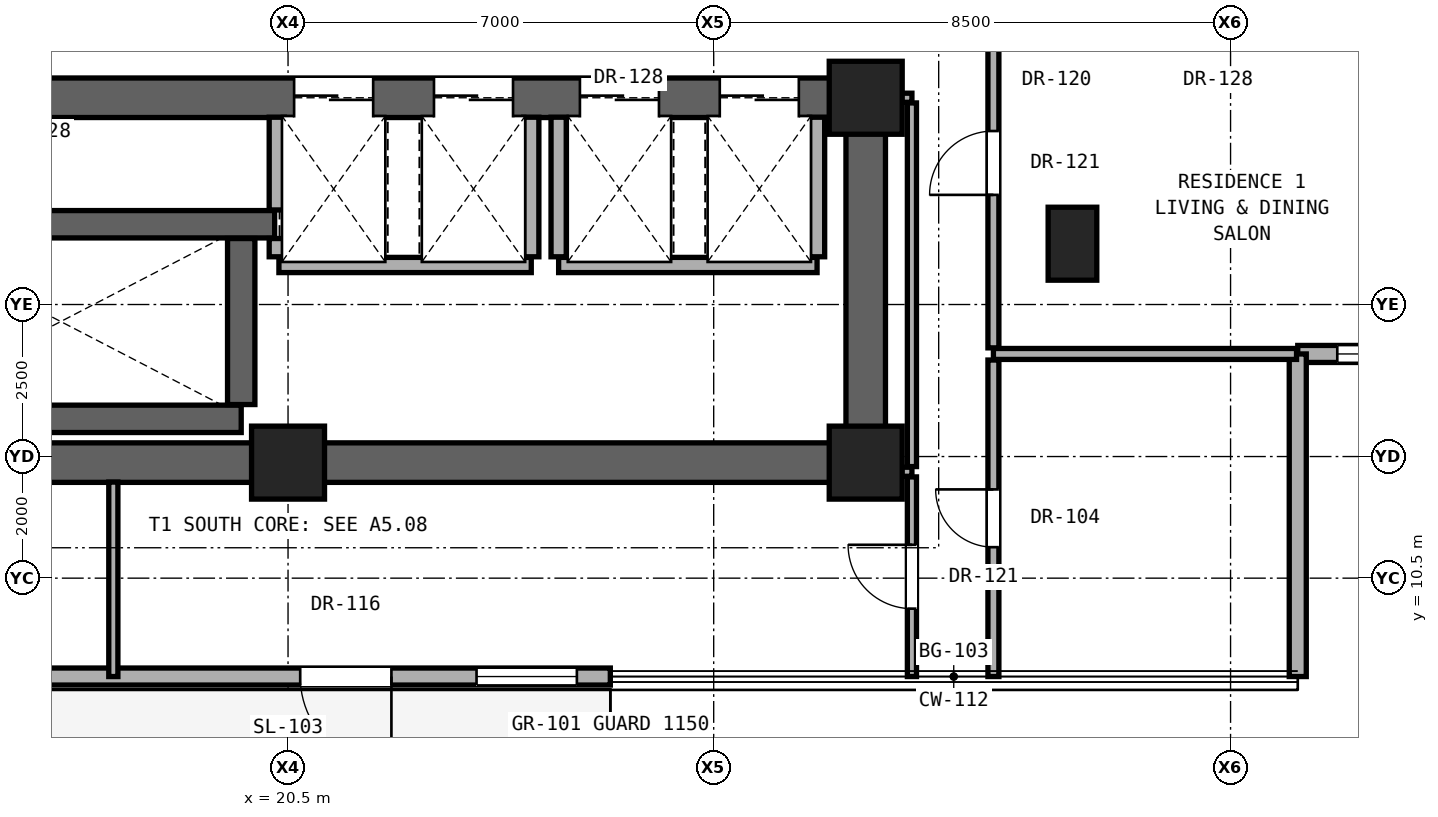
"""IFC4 building model, lengths in metres.
Left out: names, types, materials, properties, quantities, classifications, styles, units other than length and angle.
Written with IfcOpenShell. Run it as: python <this file> out.ifc"""

import sys

from ifc_helpers import new_model, si_unit, direction, frame, frame_2d, origin, origin_2d, place, context, subcontext, project, spatial, rectangle, extrude, element, fill, save


model = new_model("IFC4")
c1 = context("Model", 3, precision=1e-05, world=origin(), true_north=direction((0.0, 1.0)))
c2 = subcontext(c1, "Body", "Model", "MODEL_VIEW")
j1 = project(units=[si_unit("LENGTHUNIT", "METRE"), si_unit("PLANEANGLEUNIT", "RADIAN")], contexts=[c1])
p1 = place(None, origin())
s1 = spatial("IfcSite", under=j1, at=p1, CompositionType="ELEMENT")
p2 = place(p1, origin())
s2 = spatial("IfcBuilding", under=s1, at=p2, CompositionType="ELEMENT")
p3 = place(p2, frame((0.0, 0.0, 108.2)))
s3 = spatial("IfcBuildingStorey", under=s2, at=p3, CompositionType="ELEMENT", Elevation=108.2)
for number, where, z_axis, x_axis in (
    (1, (20.5, 12.4, 0.0), (0.0, 0.0, 1.0), (1.0, 0.0, 0.0)),
    (2, (30.0, 12.4, 0.0), (0.0, 0.0, 1.0), (1.0, 0.0, 0.0)),
    (3, (30.0, 18.4, 0.0), (0.0, 0.0, 1.0), (1.0, 0.0, 0.0)),
):
    element("IfcColumn", number, at=place(p3, frame(where, z_axis=z_axis, x_axis=x_axis)), inside=s3, PredefinedType="COLUMN", context=c2, shape_type="SweptSolid", body=[
        extrude(rectangle(XDim=1.2, YDim=1.2, at=origin_2d()), origin(), (0.0, 0.0, 1.0), 3.3),
    ])
p4 = place(p3, frame((33.4, 16.0, 0.0), z_axis=(0.0, 0.0, 1.0), x_axis=(1.0, 0.0, 0.0)))
e4 = element("IfcColumn", 4, at=p4, inside=s3, PredefinedType="PILASTER", context=c2, shape_type="SweptSolid", body=[
    extrude(rectangle(XDim=0.8, YDim=1.2, at=origin_2d()), origin(), (0.0, 0.0, 1.0), 3.3),
])
p5 = place(p3, frame((11.0, 12.4, 0.0), z_axis=(0.0, 0.0, 1.0), x_axis=(1.0, 0.0, 0.0)))
e5 = element("IfcWall", 5, at=p5, inside=s3, PredefinedType="SHEAR", context=c2, shape_type="SweptSolid", body=[
    extrude(rectangle(XDim=19.0, YDim=0.65, at=frame_2d((9.5, 0.0))), origin(), (0.0, 0.0, 1.0), 3.08),
])
p6 = place(p3, frame((30.0, 12.4, 0.0), z_axis=(0.0, 0.0, 1.0), x_axis=(0.0, 1.0, 0.0)))
e6 = element("IfcWall", 6, at=p6, inside=s3, PredefinedType="SHEAR", context=c2, shape_type="SweptSolid", body=[
    extrude(rectangle(XDim=6.0, YDim=0.65, at=frame_2d((3.0, 0.0))), origin(), (0.0, 0.0, 1.0), 3.08),
])
p7 = place(p3, frame((11.0, 18.4, 0.0), z_axis=(0.0, 0.0, 1.0), x_axis=(1.0, 0.0, 0.0)))
e7 = element("IfcWall", 7, at=p7, inside=s3, PredefinedType="SHEAR", context=c2, shape_type="SweptSolid", body=[
    extrude(rectangle(XDim=19.0, YDim=0.65, at=frame_2d((9.5, 0.0))), origin(), (0.0, 0.0, 1.0), 3.08),
])
p8 = place(p7, frame((4.175, 0.0, 0.0)))
e8 = element("IfcOpeningElement", 8, at=p8, cuts=e7, PredefinedType="OPENING", context=c2, shape_type="SweptSolid", body=[
    extrude(rectangle(XDim=1.2, YDim=2.25, at=frame_2d((0.6, 1.125))), frame((0.0, 0.335, 0.0), z_axis=(0.0, -1.0, 0.0), x_axis=(1.0, 0.0, 0.0)), (0.0, 0.0, 1.0), 0.67),
])
p9 = place(p7, frame((9.6, 0.0, 0.0)))
e9 = element("IfcOpeningElement", 9, at=p9, cuts=e7, PredefinedType="OPENING", context=c2, shape_type="SweptSolid", body=[
    extrude(rectangle(XDim=1.3, YDim=2.3, at=frame_2d((0.65, 1.15))), frame((0.0, 0.335, 0.0), z_axis=(0.0, -1.0, 0.0), x_axis=(1.0, 0.0, 0.0)), (0.0, 0.0, 1.0), 0.67),
])
p10 = place(p7, frame((11.9, 0.0, 0.0)))
e10 = element("IfcOpeningElement", 10, at=p10, cuts=e7, PredefinedType="OPENING", context=c2, shape_type="SweptSolid", body=[
    extrude(rectangle(XDim=1.3, YDim=2.3, at=frame_2d((0.65, 1.15))), frame((0.0, 0.335, 0.0), z_axis=(0.0, -1.0, 0.0), x_axis=(1.0, 0.0, 0.0)), (0.0, 0.0, 1.0), 0.67),
])
p11 = place(p7, frame((14.3, 0.0, 0.0)))
e11 = element("IfcOpeningElement", 11, at=p11, cuts=e7, PredefinedType="OPENING", context=c2, shape_type="SweptSolid", body=[
    extrude(rectangle(XDim=1.3, YDim=2.3, at=frame_2d((0.65, 1.15))), frame((0.0, 0.335, 0.0), z_axis=(0.0, -1.0, 0.0), x_axis=(1.0, 0.0, 0.0)), (0.0, 0.0, 1.0), 0.67),
])
p12 = place(p7, frame((16.6, 0.0, 0.0)))
e12 = element("IfcOpeningElement", 12, at=p12, cuts=e7, PredefinedType="OPENING", context=c2, shape_type="SweptSolid", body=[
    extrude(rectangle(XDim=1.3, YDim=2.3, at=frame_2d((0.65, 1.15))), frame((0.0, 0.335, 0.0), z_axis=(0.0, -1.0, 0.0), x_axis=(1.0, 0.0, 0.0)), (0.0, 0.0, 1.0), 0.67),
])
p13 = place(p3, frame((25.8, 8.882, 0.0), z_axis=(0.0, 0.0, 1.0), x_axis=(-1.0, 0.0, 0.0)))
e13 = element("IfcWall", 13, at=p13, inside=s3, PredefinedType="SOLIDWALL", context=c2, shape_type="SweptSolid", body=[
    extrude(rectangle(XDim=10.6, YDim=0.28, at=frame_2d((5.3, 0.0))), origin(), (0.0, 0.0, 1.0), 3.04),
])
p14 = place(p13, frame((0.55, 0.0, 0.69)))
e14 = element("IfcOpeningElement", 14, at=p14, cuts=e13, PredefinedType="OPENING", context=c2, shape_type="SweptSolid", body=[
    extrude(rectangle(XDim=1.65, YDim=2.2, at=frame_2d((0.825, 1.1))), frame((0.0, 0.15, 0.0), z_axis=(0.0, -1.0, 0.0), x_axis=(1.0, 0.0, 0.0)), (0.0, 0.0, 1.0), 0.3),
])
p15 = place(p13, frame((3.6, 0.0, 0.0)))
e15 = element("IfcOpeningElement", 15, at=p15, cuts=e13, PredefinedType="OPENING", context=c2, shape_type="SweptSolid", body=[
    extrude(rectangle(XDim=1.5, YDim=2.3, at=frame_2d((0.75, 1.15))), frame((0.0, 0.15, 0.0), z_axis=(0.0, -1.0, 0.0), x_axis=(1.0, 0.0, 0.0)), (0.0, 0.0, 1.0), 0.3),
])
p16 = place(p3, frame((37.105, 14.187, 0.0), z_axis=(0.0, 0.0, 1.0), x_axis=(1.0, 0.0, 0.0)))
e16 = element("IfcWall", 16, at=p16, inside=s3, PredefinedType="SOLIDWALL", context=c2, shape_type="SweptSolid", body=[
    extrude(rectangle(XDim=5.305, YDim=0.28, at=frame_2d((2.652, 0.0))), origin(), (0.0, 0.0, 1.0), 3.06),
])
p17 = place(p16, frame((0.65, 0.0, 0.85)))
e17 = element("IfcOpeningElement", 17, at=p17, cuts=e16, PredefinedType="OPENING", context=c2, shape_type="SweptSolid", body=[
    extrude(rectangle(XDim=1.1, YDim=2.0, at=frame_2d((0.55, 1.0))), frame((0.0, 0.15, 0.0), z_axis=(0.0, -1.0, 0.0), x_axis=(1.0, 0.0, 0.0)), (0.0, 0.0, 1.0), 0.3),
])
p18 = place(p3, frame((37.105, 8.882, 0.0), z_axis=(0.0, 0.0, 1.0), x_axis=(0.0, 1.0, 0.0)))
e18 = element("IfcWall", 18, at=p18, inside=s3, PredefinedType="SOLIDWALL", context=c2, shape_type="SweptSolid", body=[
    extrude(rectangle(XDim=5.305, YDim=0.28, at=frame_2d((2.652, 0.0))), origin(), (0.0, 0.0, 1.0), 3.06),
])
p19 = place(p3, frame((30.32, 12.25, 0.0), z_axis=(0.0, 0.0, 1.0), x_axis=(1.0, 0.0, 0.0)))
e19 = element("IfcWall", 19, at=p19, inside=s3, PredefinedType="PARTITIONING", context=c2, shape_type="SweptSolid", body=[
    extrude(rectangle(XDim=0.44, YDim=0.15, at=frame_2d((0.22, 0.0))), origin(), (0.0, 0.0, 1.0), 3.08),
])
p20 = place(p3, frame((11.32, 13.12, 0.0), z_axis=(0.0, 0.0, 1.0), x_axis=(1.0, 0.0, 0.0)))
e20 = element("IfcWall", 20, at=p20, inside=s3, PredefinedType="SHEAR", context=c2, shape_type="SweptSolid", body=[
    extrude(rectangle(XDim=8.41, YDim=0.45, at=frame_2d((4.205, 0.0))), origin(), (0.0, 0.0, 1.0), 3.08),
])
p21 = place(p3, frame((32.1, 14.187, 0.0), z_axis=(0.0, 0.0, 1.0), x_axis=(1.0, 0.0, 0.0)))
e21 = element("IfcWall", 21, at=p21, inside=s3, PredefinedType="PARTITIONING", context=c2, shape_type="SweptSolid", body=[
    extrude(rectangle(XDim=4.985, YDim=0.18, at=frame_2d((2.492, 0.0))), origin(), (0.0, 0.0, 1.0), 3.08),
])
p22 = place(p3, frame((20.35, 15.65, 0.0), z_axis=(0.0, 0.0, 1.0), x_axis=(1.0, 0.0, 0.0)))
e22 = element("IfcWall", 22, at=p22, inside=s3, PredefinedType="SOLIDWALL", context=c2, shape_type="SweptSolid", body=[
    extrude(rectangle(XDim=4.15, YDim=0.25, at=frame_2d((2.075, 0.0))), origin(), (0.0, 0.0, 1.0), 3.08),
])
p23 = place(p3, frame((24.95, 15.65, 0.0), z_axis=(0.0, 0.0, 1.0), x_axis=(1.0, 0.0, 0.0)))
e23 = element("IfcWall", 23, at=p23, inside=s3, PredefinedType="SOLIDWALL", context=c2, shape_type="SweptSolid", body=[
    extrude(rectangle(XDim=4.25, YDim=0.25, at=frame_2d((2.125, 0.0))), origin(), (0.0, 0.0, 1.0), 3.08),
])
p24 = place(p3, frame((11.32, 16.32, 0.0), z_axis=(0.0, 0.0, 1.0), x_axis=(1.0, 0.0, 0.0)))
e24 = element("IfcWall", 24, at=p24, inside=s3, PredefinedType="SHEAR", context=c2, shape_type="SweptSolid", body=[
    extrude(rectangle(XDim=8.96, YDim=0.45, at=frame_2d((4.48, 0.0))), origin(), (0.0, 0.0, 1.0), 3.08),
])
p25 = place(p24, frame((0.495, 0.0, 0.0)))
e25 = element("IfcOpeningElement", 25, at=p25, cuts=e24, PredefinedType="OPENING", context=c2, shape_type="SweptSolid", body=[
    extrude(rectangle(XDim=1.15, YDim=2.2, at=frame_2d((0.575, 1.1))), frame((0.0, 0.235, 0.0), z_axis=(0.0, -1.0, 0.0), x_axis=(1.0, 0.0, 0.0)), (0.0, 0.0, 1.0), 0.47),
])
p26 = place(p3, frame((30.32, 18.4, 0.0), z_axis=(0.0, 0.0, 1.0), x_axis=(1.0, 0.0, 0.0)))
e26 = element("IfcWall", 26, at=p26, inside=s3, PredefinedType="PARTITIONING", context=c2, shape_type="SweptSolid", body=[
    extrude(rectangle(XDim=0.44, YDim=0.15, at=frame_2d((0.22, 0.0))), origin(), (0.0, 0.0, 1.0), 2.456),
])
p27 = place(p3, frame((17.627, 8.882, 0.0), z_axis=(0.0, 0.0, 1.0), x_axis=(0.0, 1.0, 0.0)))
e27 = element("IfcWall", 27, at=p27, inside=s3, PredefinedType="PARTITIONING", context=c2, shape_type="SweptSolid", body=[
    extrude(rectangle(XDim=3.198, YDim=0.15, at=frame_2d((1.599, 0.0))), origin(), (0.0, 0.0, 1.0), 3.08),
])
p28 = place(p3, frame((19.73, 13.355, 0.0), z_axis=(0.0, 0.0, 1.0), x_axis=(0.0, 1.0, 0.0)))
e28 = element("IfcWall", 28, at=p28, inside=s3, PredefinedType="SHEAR", context=c2, shape_type="SweptSolid", body=[
    extrude(rectangle(XDim=2.73, YDim=0.45, at=frame_2d((1.365, 0.0))), origin(), (0.0, 0.0, 1.0), 3.08),
])
p29 = place(p3, frame((20.315, 15.785, 0.0), z_axis=(0.0, 0.0, 1.0), x_axis=(0.0, 1.0, 0.0)))
e29 = element("IfcWall", 29, at=p29, inside=s3, PredefinedType="SOLIDWALL", context=c2, shape_type="SweptSolid", body=[
    extrude(rectangle(XDim=0.3, YDim=0.25, at=frame_2d((0.15, 0.0))), origin(), (0.0, 0.0, 1.0), 3.08),
])
p30 = place(p3, frame((20.315, 16.555, 0.0), z_axis=(0.0, 0.0, 1.0), x_axis=(0.0, 1.0, 0.0)))
e30 = element("IfcWall", 30, at=p30, inside=s3, PredefinedType="SOLIDWALL", context=c2, shape_type="SweptSolid", body=[
    extrude(rectangle(XDim=1.525, YDim=0.25, at=frame_2d((0.763, 0.0))), origin(), (0.0, 0.0, 1.0), 3.08),
])
for number, where, z_axis, x_axis in (
    (31, (24.5, 15.785, 0.0), (0.0, 0.0, 1.0), (0.0, 1.0, 0.0)),
    (32, (24.95, 15.785, 0.0), (0.0, 0.0, 1.0), (0.0, 1.0, 0.0)),
    (33, (29.2, 15.785, 0.0), (0.0, 0.0, 1.0), (0.0, 1.0, 0.0)),
):
    element("IfcWall", number, at=place(p3, frame(where, z_axis=z_axis, x_axis=x_axis)), inside=s3, PredefinedType="SOLIDWALL", context=c2, shape_type="SweptSolid", body=[
        extrude(rectangle(XDim=2.295, YDim=0.25, at=frame_2d((1.147, 0.0))), origin(), (0.0, 0.0, 1.0), 3.08),
    ])
p31 = place(p3, frame((30.76, 8.882, 0.0), z_axis=(0.0, 0.0, 1.0), x_axis=(0.0, 1.0, 0.0)))
e34 = element("IfcWall", 34, at=p31, inside=s3, PredefinedType="PARTITIONING", context=c2, shape_type="SweptSolid", body=[
    extrude(rectangle(XDim=3.283, YDim=0.15, at=frame_2d((1.642, 0.0))), origin(), (0.0, 0.0, 1.0), 3.08),
])
p32 = place(p31, frame((1.116, 0.0, 0.0)))
e35 = element("IfcOpeningElement", 35, at=p32, cuts=e34, PredefinedType="OPENING", context=c2, shape_type="SweptSolid", body=[
    extrude(rectangle(XDim=1.05, YDim=2.2, at=frame_2d((0.525, 1.1))), frame((0.0, 0.085, 0.0), z_axis=(0.0, -1.0, 0.0), x_axis=(1.0, 0.0, 0.0)), (0.0, 0.0, 1.0), 0.17),
])
p33 = place(p3, frame((30.76, 12.335, 0.0), z_axis=(0.0, 0.0, 1.0), x_axis=(0.0, 1.0, 0.0)))
e36 = element("IfcWall", 36, at=p33, inside=s3, PredefinedType="PARTITIONING", context=c2, shape_type="SweptSolid", body=[
    extrude(rectangle(XDim=5.98, YDim=0.15, at=frame_2d((2.99, 0.0))), origin(), (0.0, 0.0, 1.0), 2.456),
])
p34 = place(p3, frame((32.1, 8.882, 0.0), z_axis=(0.0, 0.0, 1.0), x_axis=(0.0, 1.0, 0.0)))
e37 = element("IfcWall", 37, at=p34, inside=s3, PredefinedType="PARTITIONING", context=c2, shape_type="SweptSolid", body=[
    extrude(rectangle(XDim=5.205, YDim=0.18, at=frame_2d((2.603, 0.0))), origin(), (0.0, 0.0, 1.0), 3.08),
])
p35 = place(p34, frame((2.127, 0.0, 0.0)))
e38 = element("IfcOpeningElement", 38, at=p35, cuts=e37, PredefinedType="OPENING", context=c2, shape_type="SweptSolid", body=[
    extrude(rectangle(XDim=0.95, YDim=2.15, at=frame_2d((0.475, 1.075))), frame((0.0, 0.1, 0.0), z_axis=(0.0, -1.0, 0.0), x_axis=(1.0, 0.0, 0.0)), (0.0, 0.0, 1.0), 0.2),
])
p36 = place(p3, frame((32.1, 14.287, 0.0), z_axis=(0.0, 0.0, 1.0), x_axis=(0.0, 1.0, 0.0)))
e39 = element("IfcWall", 39, at=p36, inside=s3, PredefinedType="PARTITIONING", context=c2, shape_type="SweptSolid", body=[
    extrude(rectangle(XDim=5.482, YDim=0.18, at=frame_2d((2.741, 0.0))), origin(), (0.0, 0.0, 1.0), 2.456),
])
p37 = place(p36, frame((2.516, 0.0, 0.0)))
e40 = element("IfcOpeningElement", 40, at=p37, cuts=e39, PredefinedType="OPENING", context=c2, shape_type="SweptSolid", body=[
    extrude(rectangle(XDim=1.05, YDim=2.2, at=frame_2d((0.525, 1.1))), frame((0.0, 0.1, 0.0), z_axis=(0.0, -1.0, 0.0), x_axis=(1.0, 0.0, 0.0)), (0.0, 0.0, 1.0), 0.2),
])
p38 = place(p14, origin())
e41 = element("IfcWindow", 41, at=p38, inside=s3, PartitioningType="SINGLE_PANEL", PredefinedType="WINDOW", context=c2, shape_type="SweptSolid", body=[
    extrude(rectangle(XDim=1.65, YDim=2.2, at=frame_2d((0.825, 1.1))), frame((0.0, 0.03, 0.0), z_axis=(0.0, -1.0, 0.0), x_axis=(1.0, 0.0, 0.0)), (0.0, 0.0, 1.0), 0.06),
])
fill(e14, e41)
p39 = place(p15, origin())
e42 = element("IfcDoor", 42, at=p39, inside=s3, OperationType="SINGLE_SWING_LEFT", PredefinedType="DOOR", context=c2, shape_type="SweptSolid", body=[
    extrude(rectangle(XDim=1.5, YDim=2.3, at=frame_2d((0.75, 1.15))), frame((0.0, 0.025, 0.0), z_axis=(0.0, -1.0, 0.0), x_axis=(1.0, 0.0, 0.0)), (0.0, 0.0, 1.0), 0.05),
])
fill(e15, e42)
p40 = place(p17, origin())
e43 = element("IfcWindow", 43, at=p40, inside=s3, PartitioningType="SINGLE_PANEL", PredefinedType="WINDOW", context=c2, shape_type="SweptSolid", body=[
    extrude(rectangle(XDim=1.1, YDim=2.0, at=frame_2d((0.55, 1.0))), frame((0.0, 0.03, 0.0), z_axis=(0.0, -1.0, 0.0), x_axis=(1.0, 0.0, 0.0)), (0.0, 0.0, 1.0), 0.06),
])
fill(e17, e43)
p41 = place(p37, origin())
e44 = element("IfcDoor", 44, at=p41, inside=s3, OperationType="SINGLE_SWING_LEFT", PredefinedType="DOOR", context=c2, shape_type="SweptSolid", body=[
    extrude(rectangle(XDim=1.05, YDim=2.2, at=frame_2d((0.525, 1.1))), frame((0.0, 0.025, 0.0), z_axis=(0.0, -1.0, 0.0), x_axis=(1.0, 0.0, 0.0)), (0.0, 0.0, 1.0), 0.05),
])
fill(e40, e44)
p42 = place(p32, origin())
e45 = element("IfcDoor", 45, at=p42, inside=s3, OperationType="SINGLE_SWING_RIGHT", PredefinedType="DOOR", context=c2, shape_type="SweptSolid", body=[
    extrude(rectangle(XDim=1.05, YDim=2.2, at=frame_2d((0.525, 1.1))), frame((0.0, 0.025, 0.0), z_axis=(0.0, -1.0, 0.0), x_axis=(1.0, 0.0, 0.0)), (0.0, 0.0, 1.0), 0.05),
])
fill(e35, e45)
p43 = place(p35, origin())
e46 = element("IfcDoor", 46, at=p43, inside=s3, OperationType="SINGLE_SWING_RIGHT", PredefinedType="DOOR", context=c2, shape_type="SweptSolid", body=[
    extrude(rectangle(XDim=0.95, YDim=2.15, at=frame_2d((0.475, 1.075))), frame((0.0, 0.025, 0.0), z_axis=(0.0, -1.0, 0.0), x_axis=(1.0, 0.0, 0.0)), (0.0, 0.0, 1.0), 0.05),
])
fill(e38, e46)
p44 = place(p9, origin())
e47 = element("IfcDoor", 47, at=p44, inside=s3, OperationType="DOUBLE_DOOR_SLIDING", PredefinedType="DOOR", context=c2, shape_type="SweptSolid", body=[
    extrude(rectangle(XDim=1.3, YDim=2.3, at=frame_2d((0.65, 1.15))), frame((0.0, 0.025, 0.0), z_axis=(0.0, -1.0, 0.0), x_axis=(1.0, 0.0, 0.0)), (0.0, 0.0, 1.0), 0.05),
])
fill(e9, e47)
p45 = place(p10, origin())
e48 = element("IfcDoor", 48, at=p45, inside=s3, OperationType="DOUBLE_DOOR_SLIDING", PredefinedType="DOOR", context=c2, shape_type="SweptSolid", body=[
    extrude(rectangle(XDim=1.3, YDim=2.3, at=frame_2d((0.65, 1.15))), frame((0.0, 0.025, 0.0), z_axis=(0.0, -1.0, 0.0), x_axis=(1.0, 0.0, 0.0)), (0.0, 0.0, 1.0), 0.05),
])
fill(e10, e48)
p46 = place(p11, origin())
e49 = element("IfcDoor", 49, at=p46, inside=s3, OperationType="DOUBLE_DOOR_SLIDING", PredefinedType="DOOR", context=c2, shape_type="SweptSolid", body=[
    extrude(rectangle(XDim=1.3, YDim=2.3, at=frame_2d((0.65, 1.15))), frame((0.0, 0.025, 0.0), z_axis=(0.0, -1.0, 0.0), x_axis=(1.0, 0.0, 0.0)), (0.0, 0.0, 1.0), 0.05),
])
fill(e11, e49)
p47 = place(p12, origin())
e50 = element("IfcDoor", 50, at=p47, inside=s3, OperationType="DOUBLE_DOOR_SLIDING", PredefinedType="DOOR", context=c2, shape_type="SweptSolid", body=[
    extrude(rectangle(XDim=1.3, YDim=2.3, at=frame_2d((0.65, 1.15))), frame((0.0, 0.025, 0.0), z_axis=(0.0, -1.0, 0.0), x_axis=(1.0, 0.0, 0.0)), (0.0, 0.0, 1.0), 0.05),
])
fill(e12, e50)
save(model, sys.argv[1])
